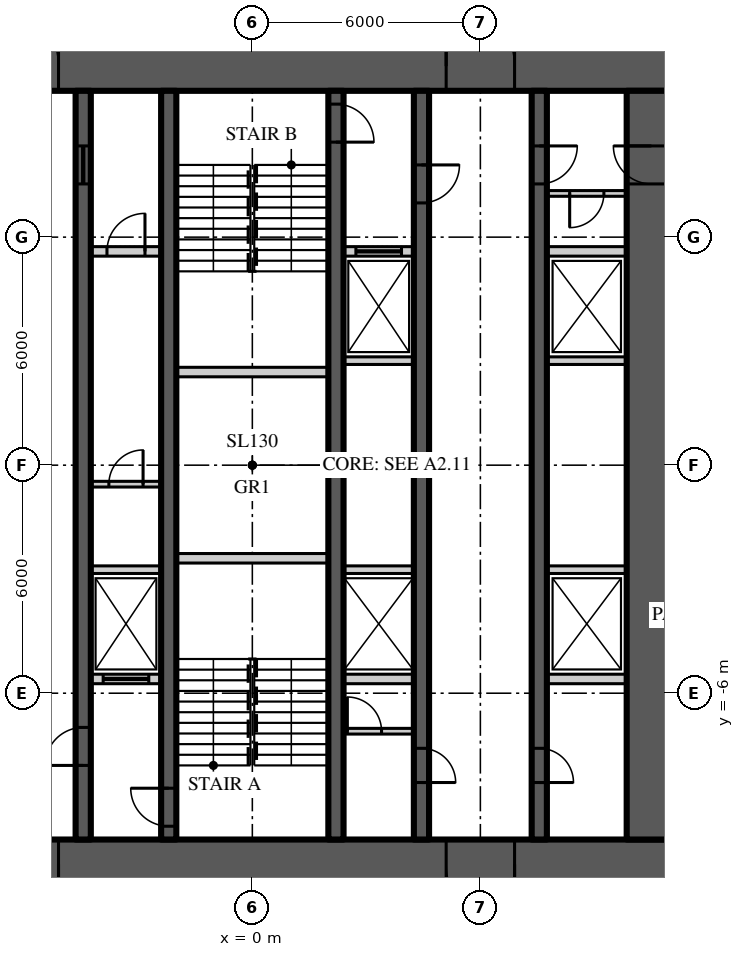
"""IFC4 building model, lengths in metres.
Left out: names, types, materials, properties, quantities, classifications, styles, units other than length and angle.
Written with IfcOpenShell. Run it as: python <this file> out.ifc"""

import sys

from ifc_helpers import new_model, si_unit, direction, frame, frame_2d, origin, place, context, subcontext, project, spatial, rectangle, extrude, element, fill, save


model = new_model("IFC4")
c1 = context("Model", 3, precision=1e-05, world=origin(), true_north=direction((0.0, 1.0)))
c2 = subcontext(c1, "Body", "Model", "MODEL_VIEW")
j1 = project(units=[si_unit("LENGTHUNIT", "METRE"), si_unit("PLANEANGLEUNIT", "RADIAN")], contexts=[c1])
p1 = place(None, origin())
s1 = spatial("IfcSite", under=j1, at=p1, CompositionType="ELEMENT")
p2 = place(p1, origin())
s2 = spatial("IfcBuilding", under=s1, at=p2, CompositionType="ELEMENT")
p3 = place(p2, frame((0.0, 0.0, 59.1)))
s3 = spatial("IfcBuildingStorey", under=s2, at=p3, CompositionType="ELEMENT", Elevation=59.1)
p4 = place(p3, frame((-11.15, 10.5, 0.0), z_axis=(0.0, 0.0, 1.0), x_axis=(1.0, 0.0, 0.0)))
e1 = element("IfcWall", 1, at=p4, inside=s3, PredefinedType="SHEAR", context=c2, shape_type="SweptSolid", body=[
    extrude(rectangle(XDim=22.3, YDim=1.3, at=frame_2d((11.15, 0.0))), origin(), (0.0, 0.0, 1.0), 3.9),
])
p5 = place(p4, frame((4.25, 0.0, 0.0)))
e2 = element("IfcOpeningElement", 2, at=p5, cuts=e1, PredefinedType="OPENING", context=c2, shape_type="SweptSolid", body=[
    extrude(rectangle(XDim=1.8, YDim=2.2, at=frame_2d((0.9, 1.1))), frame((0.0, 0.66, 0.0), z_axis=(0.0, -1.0, 0.0), x_axis=(1.0, 0.0, 0.0)), (0.0, 0.0, 1.0), 1.32),
])
p6 = place(p4, frame((16.25, 0.0, 0.0)))
e3 = element("IfcOpeningElement", 3, at=p6, cuts=e1, PredefinedType="OPENING", context=c2, shape_type="SweptSolid", body=[
    extrude(rectangle(XDim=1.8, YDim=2.2, at=frame_2d((0.9, 1.1))), frame((0.0, 0.66, 0.0), z_axis=(0.0, -1.0, 0.0), x_axis=(1.0, 0.0, 0.0)), (0.0, 0.0, 1.0), 1.32),
])
p7 = place(p3, frame((11.15, -10.5, 0.0), z_axis=(0.0, 0.0, 1.0), x_axis=(-1.0, 0.0, 0.0)))
e4 = element("IfcWall", 4, at=p7, inside=s3, PredefinedType="SHEAR", context=c2, shape_type="SweptSolid", body=[
    extrude(rectangle(XDim=22.3, YDim=1.3, at=frame_2d((11.15, 0.0))), origin(), (0.0, 0.0, 1.0), 3.9),
])
p8 = place(p7, frame((16.25, 0.0, 0.0)))
e5 = element("IfcOpeningElement", 5, at=p8, cuts=e4, PredefinedType="OPENING", context=c2, shape_type="SweptSolid", body=[
    extrude(rectangle(XDim=1.8, YDim=2.2, at=frame_2d((0.9, 1.1))), frame((0.0, 0.66, 0.0), z_axis=(0.0, -1.0, 0.0), x_axis=(1.0, 0.0, 0.0)), (0.0, 0.0, 1.0), 1.32),
])
p9 = place(p7, frame((4.25, 0.0, 0.0)))
e6 = element("IfcOpeningElement", 6, at=p9, cuts=e4, PredefinedType="OPENING", context=c2, shape_type="SweptSolid", body=[
    extrude(rectangle(XDim=1.8, YDim=2.2, at=frame_2d((0.9, 1.1))), frame((0.0, 0.66, 0.0), z_axis=(0.0, -1.0, 0.0), x_axis=(1.0, 0.0, 0.0)), (0.0, 0.0, 1.0), 1.32),
])
p10 = place(p3, frame((10.5, -9.85, 0.0), z_axis=(0.0, 0.0, 1.0), x_axis=(0.0, 1.0, 0.0)))
e7 = element("IfcWall", 7, at=p10, inside=s3, PredefinedType="SHEAR", context=c2, shape_type="SweptSolid", body=[
    extrude(rectangle(XDim=19.7, YDim=1.3, at=frame_2d((9.85, 0.0))), origin(), (0.0, 0.0, 1.0), 3.9),
])
p11 = place(p10, frame((17.25, 0.0, 0.0)))
e8 = element("IfcOpeningElement", 8, at=p11, cuts=e7, PredefinedType="OPENING", context=c2, shape_type="SweptSolid", body=[
    extrude(rectangle(XDim=1.0, YDim=2.2, at=frame_2d((0.5, 1.1))), frame((0.0, 0.66, 0.0), z_axis=(0.0, -1.0, 0.0), x_axis=(1.0, 0.0, 0.0)), (0.0, 0.0, 1.0), 1.32),
])
p12 = place(p3, frame((7.55, 9.85, 0.0), z_axis=(0.0, 0.0, 1.0), x_axis=(0.0, -1.0, 0.0)))
e9 = element("IfcWall", 9, at=p12, inside=s3, PredefinedType="SHEAR", context=c2, shape_type="SweptSolid", body=[
    extrude(rectangle(XDim=19.7, YDim=0.4, at=frame_2d((9.85, 0.0))), origin(), (0.0, 0.0, 1.0), 3.9),
])
p13 = place(p12, frame((1.45, 0.0, 0.0)))
e10 = element("IfcOpeningElement", 10, at=p13, cuts=e9, PredefinedType="OPENING", context=c2, shape_type="SweptSolid", body=[
    extrude(rectangle(XDim=1.0, YDim=2.2, at=frame_2d((0.5, 1.1))), frame((0.0, 0.21, 0.0), z_axis=(0.0, -1.0, 0.0), x_axis=(1.0, 0.0, 0.0)), (0.0, 0.0, 1.0), 0.42),
])
p14 = place(p12, frame((17.3, 0.0, 0.0)))
e11 = element("IfcOpeningElement", 11, at=p14, cuts=e9, PredefinedType="OPENING", context=c2, shape_type="SweptSolid", body=[
    extrude(rectangle(XDim=0.9, YDim=2.1, at=frame_2d((0.45, 1.05))), frame((0.0, 0.21, 0.0), z_axis=(0.0, -1.0, 0.0), x_axis=(1.0, 0.0, 0.0)), (0.0, 0.0, 1.0), 0.42),
])
p15 = place(p3, frame((-4.45, -9.85, 0.0), z_axis=(0.0, 0.0, 1.0), x_axis=(0.0, 1.0, 0.0)))
e12 = element("IfcWall", 12, at=p15, inside=s3, PredefinedType="SHEAR", context=c2, shape_type="SweptSolid", body=[
    extrude(rectangle(XDim=19.7, YDim=0.4, at=frame_2d((9.85, 0.0))), origin(), (0.0, 0.0, 1.0), 3.9),
])
p16 = place(p15, frame((1.95, 0.0, 0.0)))
e13 = element("IfcOpeningElement", 13, at=p16, cuts=e12, PredefinedType="OPENING", context=c2, shape_type="SweptSolid", body=[
    extrude(rectangle(XDim=1.0, YDim=2.2, at=frame_2d((0.5, 1.1))), frame((0.0, 0.21, 0.0), z_axis=(0.0, -1.0, 0.0), x_axis=(1.0, 0.0, 0.0)), (0.0, 0.0, 1.0), 0.42),
])
p17 = place(p15, frame((17.25, 0.0, 0.0)))
e14 = element("IfcOpeningElement", 14, at=p17, cuts=e12, PredefinedType="OPENING", context=c2, shape_type="SweptSolid", body=[
    extrude(rectangle(XDim=1.0, YDim=2.1, at=frame_2d((0.5, 1.05))), frame((0.0, 0.21, 0.0), z_axis=(0.0, -1.0, 0.0), x_axis=(1.0, 0.0, 0.0)), (0.0, 0.0, 1.0), 0.42),
])
p18 = place(p3, frame((4.45, 9.85, 0.0), z_axis=(0.0, 0.0, 1.0), x_axis=(0.0, -1.0, 0.0)))
e15 = element("IfcWall", 15, at=p18, inside=s3, PredefinedType="SHEAR", context=c2, shape_type="SweptSolid", body=[
    extrude(rectangle(XDim=19.7, YDim=0.4, at=frame_2d((9.85, 0.0))), origin(), (0.0, 0.0, 1.0), 3.9),
])
p19 = place(p18, frame((1.95, 0.0, 0.0)))
e16 = element("IfcOpeningElement", 16, at=p19, cuts=e15, PredefinedType="OPENING", context=c2, shape_type="SweptSolid", body=[
    extrude(rectangle(XDim=1.0, YDim=2.2, at=frame_2d((0.5, 1.1))), frame((0.0, 0.21, 0.0), z_axis=(0.0, -1.0, 0.0), x_axis=(1.0, 0.0, 0.0)), (0.0, 0.0, 1.0), 0.42),
])
p20 = place(p18, frame((17.3, 0.0, 0.0)))
e17 = element("IfcOpeningElement", 17, at=p20, cuts=e15, PredefinedType="OPENING", context=c2, shape_type="SweptSolid", body=[
    extrude(rectangle(XDim=0.9, YDim=2.1, at=frame_2d((0.45, 1.05))), frame((0.0, 0.21, 0.0), z_axis=(0.0, -1.0, 0.0), x_axis=(1.0, 0.0, 0.0)), (0.0, 0.0, 1.0), 0.42),
])
p21 = place(p3, frame((-2.2, -9.85, 0.0), z_axis=(0.0, 0.0, 1.0), x_axis=(0.0, 1.0, 0.0)))
e18 = element("IfcWall", 18, at=p21, inside=s3, PredefinedType="SHEAR", context=c2, shape_type="SweptSolid", body=[
    extrude(rectangle(XDim=19.7, YDim=0.4, at=frame_2d((9.85, 0.0))), origin(), (0.0, 0.0, 1.0), 3.9),
])
p22 = place(p21, frame((0.35, 0.0, 0.0)))
e19 = element("IfcOpeningElement", 19, at=p22, cuts=e18, PredefinedType="OPENING", context=c2, shape_type="SweptSolid", body=[
    extrude(rectangle(XDim=1.0, YDim=2.2, at=frame_2d((0.5, 1.1))), frame((0.0, 0.21, 0.0), z_axis=(0.0, -1.0, 0.0), x_axis=(1.0, 0.0, 0.0)), (0.0, 0.0, 1.0), 0.42),
])
p23 = place(p3, frame((2.2, 9.85, 0.0), z_axis=(0.0, 0.0, 1.0), x_axis=(0.0, -1.0, 0.0)))
e20 = element("IfcWall", 20, at=p23, inside=s3, PredefinedType="SHEAR", context=c2, shape_type="SweptSolid", body=[
    extrude(rectangle(XDim=19.7, YDim=0.4, at=frame_2d((9.85, 0.0))), origin(), (0.0, 0.0, 1.0), 3.9),
])
p24 = place(p23, frame((0.35, 0.0, 0.0)))
e21 = element("IfcOpeningElement", 21, at=p24, cuts=e20, PredefinedType="OPENING", context=c2, shape_type="SweptSolid", body=[
    extrude(rectangle(XDim=1.0, YDim=2.2, at=frame_2d((0.5, 1.1))), frame((0.0, 0.21, 0.0), z_axis=(0.0, -1.0, 0.0), x_axis=(1.0, 0.0, 0.0)), (0.0, 0.0, 1.0), 0.42),
])
p25 = place(p3, frame((-4.25, 5.625, 0.0), z_axis=(0.0, 0.0, 1.0), x_axis=(1.0, 0.0, 0.0)))
e22 = element("IfcWall", 22, at=p25, inside=s3, PredefinedType="SOLIDWALL", context=c2, shape_type="SweptSolid", body=[
    extrude(rectangle(XDim=1.85, YDim=0.25, at=frame_2d((0.925, 0.0))), origin(), (0.0, 0.0, 1.0), 3.7),
])
p26 = place(p25, frame((0.425, 0.0, 0.0)))
e23 = element("IfcOpeningElement", 23, at=p26, cuts=e22, PredefinedType="OPENING", context=c2, shape_type="SweptSolid", body=[
    extrude(rectangle(XDim=1.0, YDim=2.2, at=frame_2d((0.5, 1.1))), frame((0.0, 0.135, 0.0), z_axis=(0.0, -1.0, 0.0), x_axis=(1.0, 0.0, 0.0)), (0.0, 0.0, 1.0), 0.27),
])
p27 = place(p3, frame((2.4, 5.625, 0.0), z_axis=(0.0, 0.0, 1.0), x_axis=(1.0, 0.0, 0.0)))
e24 = element("IfcWall", 24, at=p27, inside=s3, PredefinedType="SOLIDWALL", context=c2, shape_type="SweptSolid", body=[
    extrude(rectangle(XDim=1.85, YDim=0.25, at=frame_2d((0.925, 0.0))), origin(), (0.0, 0.0, 1.0), 3.7),
])
p28 = place(p27, frame((0.325, 0.0, 0.0)))
e25 = element("IfcOpeningElement", 25, at=p28, cuts=e24, PredefinedType="OPENING", context=c2, shape_type="SweptSolid", body=[
    extrude(rectangle(XDim=1.2, YDim=2.2, at=frame_2d((0.6, 1.1))), frame((0.0, 0.135, 0.0), z_axis=(0.0, -1.0, 0.0), x_axis=(1.0, 0.0, 0.0)), (0.0, 0.0, 1.0), 0.27),
])
p29 = place(p3, frame((7.75, 5.625, 0.0), z_axis=(0.0, 0.0, 1.0), x_axis=(1.0, 0.0, 0.0)))
e26 = element("IfcWall", 26, at=p29, inside=s3, PredefinedType="SOLIDWALL", context=c2, shape_type="SweptSolid", body=[
    extrude(rectangle(XDim=2.1, YDim=0.25, at=frame_2d((1.05, 0.0))), origin(), (0.0, 0.0, 1.0), 3.7),
])
p30 = place(p3, frame((-4.25, -5.625, 0.0), z_axis=(0.0, 0.0, 1.0), x_axis=(1.0, 0.0, 0.0)))
e27 = element("IfcWall", 27, at=p30, inside=s3, PredefinedType="SOLIDWALL", context=c2, shape_type="SweptSolid", body=[
    extrude(rectangle(XDim=1.85, YDim=0.25, at=frame_2d((0.925, 0.0))), origin(), (0.0, 0.0, 1.0), 3.7),
])
p31 = place(p30, frame((0.325, 0.0, 0.0)))
e28 = element("IfcOpeningElement", 28, at=p31, cuts=e27, PredefinedType="OPENING", context=c2, shape_type="SweptSolid", body=[
    extrude(rectangle(XDim=1.2, YDim=2.2, at=frame_2d((0.6, 1.1))), frame((0.0, 0.135, 0.0), z_axis=(0.0, -1.0, 0.0), x_axis=(1.0, 0.0, 0.0)), (0.0, 0.0, 1.0), 0.27),
])
p32 = place(p3, frame((2.4, -5.625, 0.0), z_axis=(0.0, 0.0, 1.0), x_axis=(1.0, 0.0, 0.0)))
e29 = element("IfcWall", 29, at=p32, inside=s3, PredefinedType="SOLIDWALL", context=c2, shape_type="SweptSolid", body=[
    extrude(rectangle(XDim=1.85, YDim=0.25, at=frame_2d((0.925, 0.0))), origin(), (0.0, 0.0, 1.0), 3.7),
])
p33 = place(p3, frame((7.75, -5.625, 0.0), z_axis=(0.0, 0.0, 1.0), x_axis=(1.0, 0.0, 0.0)))
e30 = element("IfcWall", 30, at=p33, inside=s3, PredefinedType="SOLIDWALL", context=c2, shape_type="SweptSolid", body=[
    extrude(rectangle(XDim=2.1, YDim=0.25, at=frame_2d((1.05, 0.0))), origin(), (0.0, 0.0, 1.0), 3.7),
])
for number, where, z_axis, x_axis in (
    (31, (-2.0, -2.45, 0.0), (0.0, 0.0, 1.0), (1.0, 0.0, 0.0)),
    (32, (-2.0, 2.45, 0.0), (0.0, 0.0, 1.0), (1.0, 0.0, 0.0)),
):
    element("IfcWall", number, at=place(p3, frame(where, z_axis=z_axis, x_axis=x_axis)), inside=s3, PredefinedType="SOLIDWALL", context=c2, shape_type="SweptSolid", body=[
        extrude(rectangle(XDim=4.0, YDim=0.25, at=frame_2d((2.0, 0.0))), origin(), (0.0, 0.0, 1.0), 3.7),
    ])
for number, where, z_axis, x_axis in (
    (33, (-4.25, -2.75, 0.0), (0.0, 0.0, 1.0), (1.0, 0.0, 0.0)),
    (34, (2.4, -2.75, 0.0), (0.0, 0.0, 1.0), (1.0, 0.0, 0.0)),
):
    element("IfcWall", number, at=place(p3, frame(where, z_axis=z_axis, x_axis=x_axis)), inside=s3, PredefinedType="SOLIDWALL", context=c2, shape_type="SweptSolid", body=[
        extrude(rectangle(XDim=1.85, YDim=0.2, at=frame_2d((0.925, 0.0))), origin(), (0.0, 0.0, 1.0), 3.7),
    ])
p34 = place(p3, frame((7.75, -2.75, 0.0), z_axis=(0.0, 0.0, 1.0), x_axis=(1.0, 0.0, 0.0)))
e35 = element("IfcWall", 35, at=p34, inside=s3, PredefinedType="SOLIDWALL", context=c2, shape_type="SweptSolid", body=[
    extrude(rectangle(XDim=2.1, YDim=0.2, at=frame_2d((1.05, 0.0))), origin(), (0.0, 0.0, 1.0), 3.7),
])
p35 = place(p3, frame((2.4, 2.75, 0.0), z_axis=(0.0, 0.0, 1.0), x_axis=(1.0, 0.0, 0.0)))
e36 = element("IfcWall", 36, at=p35, inside=s3, PredefinedType="SOLIDWALL", context=c2, shape_type="SweptSolid", body=[
    extrude(rectangle(XDim=1.85, YDim=0.2, at=frame_2d((0.925, 0.0))), origin(), (0.0, 0.0, 1.0), 3.7),
])
p36 = place(p3, frame((7.75, 2.75, 0.0), z_axis=(0.0, 0.0, 1.0), x_axis=(1.0, 0.0, 0.0)))
e37 = element("IfcWall", 37, at=p36, inside=s3, PredefinedType="SOLIDWALL", context=c2, shape_type="SweptSolid", body=[
    extrude(rectangle(XDim=2.1, YDim=0.2, at=frame_2d((1.05, 0.0))), origin(), (0.0, 0.0, 1.0), 3.7),
])
p37 = place(p3, frame((-4.25, -0.5, 0.0), z_axis=(0.0, 0.0, 1.0), x_axis=(1.0, 0.0, 0.0)))
e38 = element("IfcWall", 38, at=p37, inside=s3, PredefinedType="SOLIDWALL", context=c2, shape_type="SweptSolid", body=[
    extrude(rectangle(XDim=1.85, YDim=0.15, at=frame_2d((0.925, 0.0))), origin(), (0.0, 0.0, 1.0), 3.77),
])
p38 = place(p37, frame((0.475, 0.0, 0.0)))
e39 = element("IfcOpeningElement", 39, at=p38, cuts=e38, PredefinedType="OPENING", context=c2, shape_type="SweptSolid", body=[
    extrude(rectangle(XDim=0.9, YDim=2.1, at=frame_2d((0.45, 1.05))), frame((0.0, 0.085, 0.0), z_axis=(0.0, -1.0, 0.0), x_axis=(1.0, 0.0, 0.0)), (0.0, 0.0, 1.0), 0.17),
])
p39 = place(p3, frame((2.4, -7.0, 0.0), z_axis=(0.0, 0.0, 1.0), x_axis=(1.0, 0.0, 0.0)))
e40 = element("IfcWall", 40, at=p39, inside=s3, PredefinedType="SOLIDWALL", context=c2, shape_type="SweptSolid", body=[
    extrude(rectangle(XDim=1.85, YDim=0.15, at=frame_2d((0.925, 0.0))), origin(), (0.0, 0.0, 1.0), 3.77),
])
p40 = place(p39, frame((0.1, 0.0, 0.0)))
e41 = element("IfcOpeningElement", 41, at=p40, cuts=e40, PredefinedType="OPENING", context=c2, shape_type="SweptSolid", body=[
    extrude(rectangle(XDim=0.9, YDim=2.1, at=frame_2d((0.45, 1.05))), frame((0.0, 0.085, 0.0), z_axis=(0.0, -1.0, 0.0), x_axis=(1.0, 0.0, 0.0)), (0.0, 0.0, 1.0), 0.17),
])
p41 = place(p3, frame((9.85, 7.15, 0.0), z_axis=(0.0, 0.0, 1.0), x_axis=(-1.0, 0.0, 0.0)))
e42 = element("IfcWall", 42, at=p41, inside=s3, PredefinedType="SOLIDWALL", context=c2, shape_type="SweptSolid", body=[
    extrude(rectangle(XDim=2.1, YDim=0.15, at=frame_2d((1.05, 0.0))), origin(), (0.0, 0.0, 1.0), 3.77),
])
p42 = place(p41, frame((0.6, 0.0, 0.0)))
e43 = element("IfcOpeningElement", 43, at=p42, cuts=e42, PredefinedType="OPENING", context=c2, shape_type="SweptSolid", body=[
    extrude(rectangle(XDim=0.9, YDim=2.1, at=frame_2d((0.45, 1.05))), frame((0.0, 0.085, 0.0), z_axis=(0.0, -1.0, 0.0), x_axis=(1.0, 0.0, 0.0)), (0.0, 0.0, 1.0), 0.17),
])
p43 = place(p5, origin())
e44 = element("IfcDoor", 44, at=p43, inside=s3, OperationType="DOUBLE_DOOR_DOUBLE_SWING", PredefinedType="DOOR", context=c2, shape_type="SweptSolid", body=[
    extrude(rectangle(XDim=1.8, YDim=2.2, at=frame_2d((0.9, 1.1))), frame((0.0, 0.025, 0.0), z_axis=(0.0, -1.0, 0.0), x_axis=(1.0, 0.0, 0.0)), (0.0, 0.0, 1.0), 0.05),
])
fill(e2, e44)
p44 = place(p8, origin())
e45 = element("IfcDoor", 45, at=p44, inside=s3, OperationType="DOUBLE_DOOR_DOUBLE_SWING", PredefinedType="DOOR", context=c2, shape_type="SweptSolid", body=[
    extrude(rectangle(XDim=1.8, YDim=2.2, at=frame_2d((0.9, 1.1))), frame((0.0, 0.025, 0.0), z_axis=(0.0, -1.0, 0.0), x_axis=(1.0, 0.0, 0.0)), (0.0, 0.0, 1.0), 0.05),
])
fill(e5, e45)
p45 = place(p6, origin())
e46 = element("IfcDoor", 46, at=p45, inside=s3, OperationType="DOUBLE_DOOR_DOUBLE_SWING", PredefinedType="DOOR", context=c2, shape_type="SweptSolid", body=[
    extrude(rectangle(XDim=1.8, YDim=2.2, at=frame_2d((0.9, 1.1))), frame((0.0, 0.025, 0.0), z_axis=(0.0, -1.0, 0.0), x_axis=(1.0, 0.0, 0.0)), (0.0, 0.0, 1.0), 0.05),
])
fill(e3, e46)
p46 = place(p9, origin())
e47 = element("IfcDoor", 47, at=p46, inside=s3, OperationType="DOUBLE_DOOR_DOUBLE_SWING", PredefinedType="DOOR", context=c2, shape_type="SweptSolid", body=[
    extrude(rectangle(XDim=1.8, YDim=2.2, at=frame_2d((0.9, 1.1))), frame((0.0, 0.025, 0.0), z_axis=(0.0, -1.0, 0.0), x_axis=(1.0, 0.0, 0.0)), (0.0, 0.0, 1.0), 0.05),
])
fill(e6, e47)
p47 = place(p13, origin())
e48 = element("IfcDoor", 48, at=p47, inside=s3, OperationType="SINGLE_SWING_LEFT", PredefinedType="DOOR", context=c2, shape_type="SweptSolid", body=[
    extrude(rectangle(XDim=1.0, YDim=2.2, at=frame_2d((0.5, 1.1))), frame((0.0, 0.025, 0.0), z_axis=(0.0, -1.0, 0.0), x_axis=(1.0, 0.0, 0.0)), (0.0, 0.0, 1.0), 0.05),
])
fill(e10, e48)
p48 = place(p11, origin())
e49 = element("IfcDoor", 49, at=p48, inside=s3, OperationType="SINGLE_SWING_RIGHT", PredefinedType="DOOR", context=c2, shape_type="SweptSolid", body=[
    extrude(rectangle(XDim=1.0, YDim=2.2, at=frame_2d((0.5, 1.1))), frame((0.0, 0.025, 0.0), z_axis=(0.0, -1.0, 0.0), x_axis=(1.0, 0.0, 0.0)), (0.0, 0.0, 1.0), 0.05),
])
fill(e8, e49)
p49 = place(p16, origin())
e50 = element("IfcDoor", 50, at=p49, inside=s3, OperationType="SINGLE_SWING_LEFT", PredefinedType="DOOR", context=c2, shape_type="SweptSolid", body=[
    extrude(rectangle(XDim=1.0, YDim=2.2, at=frame_2d((0.5, 1.1))), frame((0.0, 0.025, 0.0), z_axis=(0.0, -1.0, 0.0), x_axis=(1.0, 0.0, 0.0)), (0.0, 0.0, 1.0), 0.05),
])
fill(e13, e50)
p50 = place(p22, origin())
e51 = element("IfcDoor", 51, at=p50, inside=s3, OperationType="SINGLE_SWING_RIGHT", PredefinedType="DOOR", context=c2, shape_type="SweptSolid", body=[
    extrude(rectangle(XDim=1.0, YDim=2.2, at=frame_2d((0.5, 1.1))), frame((0.0, 0.025, 0.0), z_axis=(0.0, -1.0, 0.0), x_axis=(1.0, 0.0, 0.0)), (0.0, 0.0, 1.0), 0.05),
])
fill(e19, e51)
p51 = place(p19, origin())
e52 = element("IfcDoor", 52, at=p51, inside=s3, OperationType="SINGLE_SWING_LEFT", PredefinedType="DOOR", context=c2, shape_type="SweptSolid", body=[
    extrude(rectangle(XDim=1.0, YDim=2.2, at=frame_2d((0.5, 1.1))), frame((0.0, 0.025, 0.0), z_axis=(0.0, -1.0, 0.0), x_axis=(1.0, 0.0, 0.0)), (0.0, 0.0, 1.0), 0.05),
])
fill(e16, e52)
p52 = place(p24, origin())
e53 = element("IfcDoor", 53, at=p52, inside=s3, OperationType="SINGLE_SWING_RIGHT", PredefinedType="DOOR", context=c2, shape_type="SweptSolid", body=[
    extrude(rectangle(XDim=1.0, YDim=2.2, at=frame_2d((0.5, 1.1))), frame((0.0, 0.025, 0.0), z_axis=(0.0, -1.0, 0.0), x_axis=(1.0, 0.0, 0.0)), (0.0, 0.0, 1.0), 0.05),
])
fill(e21, e53)
p53 = place(p17, origin())
e54 = element("IfcDoor", 54, at=p53, inside=s3, OperationType="SLIDING_TO_LEFT", PredefinedType="DOOR", context=c2, shape_type="SweptSolid", body=[
    extrude(rectangle(XDim=1.0, YDim=2.1, at=frame_2d((0.5, 1.05))), frame((0.0, 0.025, 0.0), z_axis=(0.0, -1.0, 0.0), x_axis=(1.0, 0.0, 0.0)), (0.0, 0.0, 1.0), 0.05),
])
fill(e14, e54)
p54 = place(p14, origin())
e55 = element("IfcDoor", 55, at=p54, inside=s3, OperationType="SINGLE_SWING_RIGHT", PredefinedType="DOOR", context=c2, shape_type="SweptSolid", body=[
    extrude(rectangle(XDim=0.9, YDim=2.1, at=frame_2d((0.45, 1.05))), frame((0.0, 0.025, 0.0), z_axis=(0.0, -1.0, 0.0), x_axis=(1.0, 0.0, 0.0)), (0.0, 0.0, 1.0), 0.05),
])
fill(e11, e55)
p55 = place(p20, origin())
e56 = element("IfcDoor", 56, at=p55, inside=s3, OperationType="SINGLE_SWING_RIGHT", PredefinedType="DOOR", context=c2, shape_type="SweptSolid", body=[
    extrude(rectangle(XDim=0.9, YDim=2.1, at=frame_2d((0.45, 1.05))), frame((0.0, 0.025, 0.0), z_axis=(0.0, -1.0, 0.0), x_axis=(1.0, 0.0, 0.0)), (0.0, 0.0, 1.0), 0.05),
])
fill(e17, e56)
p56 = place(p31, origin())
e57 = element("IfcDoor", 57, at=p56, inside=s3, OperationType="SLIDING_TO_LEFT", PredefinedType="DOOR", context=c2, shape_type="SweptSolid", body=[
    extrude(rectangle(XDim=1.2, YDim=2.2, at=frame_2d((0.6, 1.1))), frame((0.0, 0.025, 0.0), z_axis=(0.0, -1.0, 0.0), x_axis=(1.0, 0.0, 0.0)), (0.0, 0.0, 1.0), 0.05),
])
fill(e28, e57)
p57 = place(p28, origin())
e58 = element("IfcDoor", 58, at=p57, inside=s3, OperationType="SLIDING_TO_LEFT", PredefinedType="DOOR", context=c2, shape_type="SweptSolid", body=[
    extrude(rectangle(XDim=1.2, YDim=2.2, at=frame_2d((0.6, 1.1))), frame((0.0, 0.025, 0.0), z_axis=(0.0, -1.0, 0.0), x_axis=(1.0, 0.0, 0.0)), (0.0, 0.0, 1.0), 0.05),
])
fill(e25, e58)
p58 = place(p38, origin())
e59 = element("IfcDoor", 59, at=p58, inside=s3, OperationType="SINGLE_SWING_RIGHT", PredefinedType="DOOR", context=c2, shape_type="SweptSolid", body=[
    extrude(rectangle(XDim=0.9, YDim=2.1, at=frame_2d((0.45, 1.05))), frame((0.0, 0.025, 0.0), z_axis=(0.0, -1.0, 0.0), x_axis=(1.0, 0.0, 0.0)), (0.0, 0.0, 1.0), 0.05),
])
fill(e39, e59)
p59 = place(p26, origin())
e60 = element("IfcDoor", 60, at=p59, inside=s3, OperationType="SINGLE_SWING_RIGHT", PredefinedType="DOOR", context=c2, shape_type="SweptSolid", body=[
    extrude(rectangle(XDim=1.0, YDim=2.2, at=frame_2d((0.5, 1.1))), frame((0.0, 0.025, 0.0), z_axis=(0.0, -1.0, 0.0), x_axis=(1.0, 0.0, 0.0)), (0.0, 0.0, 1.0), 0.05),
])
fill(e23, e60)
p60 = place(p40, origin())
e61 = element("IfcDoor", 61, at=p60, inside=s3, OperationType="SINGLE_SWING_LEFT", PredefinedType="DOOR", context=c2, shape_type="SweptSolid", body=[
    extrude(rectangle(XDim=0.9, YDim=2.1, at=frame_2d((0.45, 1.05))), frame((0.0, 0.025, 0.0), z_axis=(0.0, -1.0, 0.0), x_axis=(1.0, 0.0, 0.0)), (0.0, 0.0, 1.0), 0.05),
])
fill(e41, e61)
p61 = place(p42, origin())
e62 = element("IfcDoor", 62, at=p61, inside=s3, OperationType="SINGLE_SWING_RIGHT", PredefinedType="DOOR", context=c2, shape_type="SweptSolid", body=[
    extrude(rectangle(XDim=0.9, YDim=2.1, at=frame_2d((0.45, 1.05))), frame((0.0, 0.025, 0.0), z_axis=(0.0, -1.0, 0.0), x_axis=(1.0, 0.0, 0.0)), (0.0, 0.0, 1.0), 0.05),
])
fill(e43, e62)
save(model, sys.argv[1])
